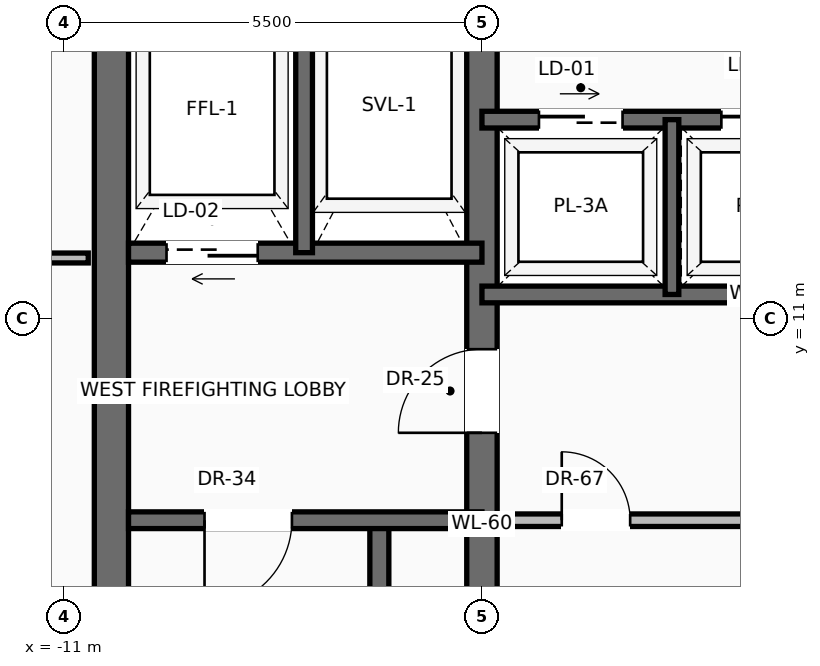
"""IFC4 building model, lengths in metres.
Left out: names, types, materials, properties, quantities, classifications, styles, units other than length and angle.
Written with IfcOpenShell. Run it as: python <this file> out.ifc"""

import sys

from ifc_helpers import new_model, si_unit, direction, frame, frame_2d, origin, place, context, subcontext, project, spatial, rectangle, extrude, source, transform, mapped, element, fill, save


model = new_model("IFC4")
c1 = context("Model", 3, precision=1e-05, world=origin(), true_north=direction((0.0, 1.0)))
c2 = subcontext(c1, "Body", "Model", "MODEL_VIEW")
j1 = project(units=[si_unit("LENGTHUNIT", "METRE"), si_unit("PLANEANGLEUNIT", "RADIAN")], contexts=[c1])
p1 = place(None, origin())
s1 = spatial("IfcSite", under=j1, at=p1, CompositionType="ELEMENT")
p2 = place(p1, origin())
s2 = spatial("IfcBuilding", under=s1, at=p2, CompositionType="ELEMENT")
p3 = place(p2, frame((0.0, 0.0, 293.7)))
s3 = spatial("IfcBuildingStorey", under=s2, at=p3, CompositionType="ELEMENT", Elevation=293.7)
p4 = place(p3, frame((-10.375, 0.625, 0.0), z_axis=(0.0, 0.0, 1.0), x_axis=(0.0, 1.0, 0.0)))
e1 = element("IfcWall", 1, at=p4, inside=s3, PredefinedType="SHEAR", context=c2, shape_type="SweptSolid", body=[
    extrude(rectangle(XDim=15.35, YDim=0.45, at=frame_2d((7.675, 0.0))), origin(), (0.0, 0.0, 1.0), 3.24),
])
p5 = place(p3, frame((-5.5, 0.625, 0.0), z_axis=(0.0, 0.0, 1.0), x_axis=(0.0, 1.0, 0.0)))
e2 = element("IfcWall", 2, at=p5, inside=s3, PredefinedType="SHEAR", context=c2, shape_type="SweptSolid", body=[
    extrude(rectangle(XDim=15.35, YDim=0.4, at=frame_2d((7.675, 0.0))), origin(), (0.0, 0.0, 1.0), 3.24),
])
p6 = place(p5, frame((8.875, 0.0, 0.0)))
e3 = element("IfcOpeningElement", 3, at=p6, cuts=e2, PredefinedType="OPENING", context=c2, shape_type="SweptSolid", body=[
    extrude(rectangle(XDim=1.1, YDim=2.2, at=frame_2d((0.55, 1.1))), frame((0.0, 0.21, 0.0), z_axis=(0.0, -1.0, 0.0), x_axis=(1.0, 0.0, 0.0)), (0.0, 0.0, 1.0), 0.42),
])
p7 = place(p3, frame((-17.955, 13.837, 0.0), z_axis=(0.0, 0.0, 1.0), x_axis=(0.49757006288, 0.867423790616, 0.0)))
e4 = element("IfcWall", 4, at=p7, inside=s3, PredefinedType="SOLIDWALL", context=c2, shape_type="SweptSolid", body=[
    extrude(rectangle(XDim=20.328, YDim=0.28, at=frame_2d((10.164, 0.0))), origin(), (0.0, 0.0, 1.0), 2.82),
])
p8 = place(p7, frame((4.879, 0.0, 0.0)))
e5 = element("IfcOpeningElement", 5, at=p8, cuts=e4, PredefinedType="OPENING", context=c2, shape_type="SweptSolid", body=[
    extrude(rectangle(XDim=1.6, YDim=2.35, at=frame_2d((0.8, 1.175))), frame((0.0, 0.15, 0.0), z_axis=(0.0, -1.0, 0.0), x_axis=(1.0, 0.0, 0.0)), (0.0, 0.0, 1.0), 0.3),
])
p9 = place(p7, frame((13.823, 0.0, 0.9)))
e6 = element("IfcOpeningElement", 6, at=p9, cuts=e4, PredefinedType="OPENING", context=c2, shape_type="SweptSolid", body=[
    extrude(rectangle(XDim=1.55, YDim=1.75, at=frame_2d((0.775, 0.875))), frame((0.0, 0.15, 0.0), z_axis=(0.0, -1.0, 0.0), x_axis=(1.0, 0.0, 0.0)), (0.0, 0.0, 1.0), 0.3),
])
p10 = place(p3, frame((-6.85, 0.85, 0.0), z_axis=(0.0, 0.0, 1.0), x_axis=(0.0, 1.0, 0.0)))
e7 = element("IfcWall", 7, at=p10, inside=s3, PredefinedType="SOLIDWALL", context=c2, shape_type="SweptSolid", body=[
    extrude(rectangle(XDim=7.5, YDim=0.25, at=frame_2d((3.75, 0.0))), origin(), (0.0, 0.0, 1.0), 3.24),
])
p11 = place(p3, frame((-5.5, 8.35, 0.0), z_axis=(0.0, 0.0, 1.0), x_axis=(-1.0, 0.0, 0.0)))
e8 = element("IfcWall", 8, at=p11, inside=s3, PredefinedType="SOLIDWALL", context=c2, shape_type="SweptSolid", body=[
    extrude(rectangle(XDim=4.65, YDim=0.22, at=frame_2d((2.325, 0.0))), origin(), (0.0, 0.0, 1.0), 3.24),
])
p12 = place(p11, frame((2.5, 0.0, 0.0)))
e9 = element("IfcOpeningElement", 9, at=p12, cuts=e8, PredefinedType="OPENING", context=c2, shape_type="SweptSolid", body=[
    extrude(rectangle(XDim=1.15, YDim=2.2, at=frame_2d((0.575, 1.1))), frame((0.0, 0.12, 0.0), z_axis=(0.0, -1.0, 0.0), x_axis=(1.0, 0.0, 0.0)), (0.0, 0.0, 1.0), 0.24),
])
p13 = place(p3, frame((-5.5, 11.87, 0.0), z_axis=(0.0, 0.0, 1.0), x_axis=(-1.0, 0.0, 0.0)))
e10 = element("IfcWall", 10, at=p13, inside=s3, PredefinedType="SOLIDWALL", context=c2, shape_type="SweptSolid", body=[
    extrude(rectangle(XDim=4.65, YDim=0.25, at=frame_2d((2.325, 0.0))), origin(), (0.0, 0.0, 1.0), 3.24),
])
p14 = place(p13, frame((2.95, 0.0, 0.0)))
e11 = element("IfcOpeningElement", 11, at=p14, cuts=e10, PredefinedType="OPENING", context=c2, shape_type="SweptSolid", body=[
    extrude(rectangle(XDim=1.2, YDim=2.25, at=frame_2d((0.6, 1.125))), frame((0.0, 0.135, 0.0), z_axis=(0.0, -1.0, 0.0), x_axis=(1.0, 0.0, 0.0)), (0.0, 0.0, 1.0), 0.27),
])
p15 = place(p3, frame((-7.84, 11.87, 0.0), z_axis=(0.0, 0.0, 1.0), x_axis=(0.0, 1.0, 0.0)))
e12 = element("IfcWall", 12, at=p15, inside=s3, PredefinedType="SOLIDWALL", context=c2, shape_type="SweptSolid", body=[
    extrude(rectangle(XDim=3.88, YDim=0.22, at=frame_2d((1.94, 0.0))), origin(), (0.0, 0.0, 1.0), 3.24),
])
p16 = place(p3, frame((-5.3, 8.35, 0.0), z_axis=(0.0, 0.0, 1.0), x_axis=(1.0, 0.0, 0.0)))
e13 = element("IfcWall", 13, at=p16, inside=s3, PredefinedType="PARTITIONING", context=c2, shape_type="SweptSolid", body=[
    extrude(rectangle(XDim=7.12, YDim=0.165, at=frame_2d((3.56, 0.0))), origin(), (0.0, 0.0, 1.0), 3.232),
])
p17 = place(p16, frame((0.85, 0.0, 0.0)))
e14 = element("IfcOpeningElement", 14, at=p17, cuts=e13, PredefinedType="OPENING", context=c2, shape_type="SweptSolid", body=[
    extrude(rectangle(XDim=0.9, YDim=2.1, at=frame_2d((0.45, 1.05))), frame((0.0, 0.093, 0.0), z_axis=(0.0, -1.0, 0.0), x_axis=(1.0, 0.0, 0.0)), (0.0, 0.0, 1.0), 0.185),
])
p18 = place(p16, frame((5.65, 0.0, 0.0)))
e15 = element("IfcOpeningElement", 15, at=p18, cuts=e13, PredefinedType="OPENING", context=c2, shape_type="SweptSolid", body=[
    extrude(rectangle(XDim=0.9, YDim=2.1, at=frame_2d((0.45, 1.05))), frame((0.0, 0.093, 0.0), z_axis=(0.0, -1.0, 0.0), x_axis=(1.0, 0.0, 0.0)), (0.0, 0.0, 1.0), 0.185),
])
p19 = place(p3, frame((-5.5, 11.32, 0.0), z_axis=(0.0, 0.0, 1.0), x_axis=(1.0, 0.0, 0.0)))
e16 = element("IfcWall", 16, at=p19, inside=s3, PredefinedType="SOLIDWALL", context=c2, shape_type="SweptSolid", body=[
    extrude(rectangle(XDim=7.32, YDim=0.22, at=frame_2d((3.66, 0.0))), origin(), (0.0, 0.0, 1.0), 3.24),
])
p20 = place(p3, frame((-5.5, 13.62, 0.0), z_axis=(0.0, 0.0, 1.0), x_axis=(1.0, 0.0, 0.0)))
e17 = element("IfcWall", 17, at=p20, inside=s3, PredefinedType="SOLIDWALL", context=c2, shape_type="SweptSolid", body=[
    extrude(rectangle(XDim=7.32, YDim=0.22, at=frame_2d((3.66, 0.0))), origin(), (0.0, 0.0, 1.0), 3.24),
])
p21 = place(p20, frame((0.75, 0.0, 0.0)))
e18 = element("IfcOpeningElement", 18, at=p21, cuts=e17, PredefinedType="OPENING", context=c2, shape_type="SweptSolid", body=[
    extrude(rectangle(XDim=1.1, YDim=2.2, at=frame_2d((0.55, 1.1))), frame((0.0, 0.12, 0.0), z_axis=(0.0, -1.0, 0.0), x_axis=(1.0, 0.0, 0.0)), (0.0, 0.0, 1.0), 0.24),
])
p22 = place(p20, frame((3.15, 0.0, 0.0)))
e19 = element("IfcOpeningElement", 19, at=p22, cuts=e17, PredefinedType="OPENING", context=c2, shape_type="SweptSolid", body=[
    extrude(rectangle(XDim=1.1, YDim=2.2, at=frame_2d((0.55, 1.1))), frame((0.0, 0.12, 0.0), z_axis=(0.0, -1.0, 0.0), x_axis=(1.0, 0.0, 0.0)), (0.0, 0.0, 1.0), 0.24),
])
p23 = place(p20, frame((5.55, 0.0, 0.0)))
e20 = element("IfcOpeningElement", 20, at=p23, cuts=e17, PredefinedType="OPENING", context=c2, shape_type="SweptSolid", body=[
    extrude(rectangle(XDim=1.1, YDim=2.2, at=frame_2d((0.55, 1.1))), frame((0.0, 0.12, 0.0), z_axis=(0.0, -1.0, 0.0), x_axis=(1.0, 0.0, 0.0)), (0.0, 0.0, 1.0), 0.24),
])
p24 = place(p3, frame((-3.0, 11.32, 0.0), z_axis=(0.0, 0.0, 1.0), x_axis=(0.0, 1.0, 0.0)))
e21 = element("IfcWall", 21, at=p24, inside=s3, PredefinedType="SOLIDWALL", context=c2, shape_type="SweptSolid", body=[
    extrude(rectangle(XDim=2.3, YDim=0.18, at=frame_2d((1.15, 0.0))), origin(), (0.0, 0.0, 1.0), 3.24),
])
p25 = place(p3, frame((-19.273, 11.8, 0.0), z_axis=(0.0, 0.0, 1.0), x_axis=(1.0, 0.0, 0.0)))
e22 = element("IfcWall", 22, at=p25, inside=s3, PredefinedType="PARTITIONING", context=c2, shape_type="SweptSolid", body=[
    extrude(rectangle(XDim=8.593, YDim=0.13, at=frame_2d((4.297, 0.0))), origin(), (0.0, 0.0, 1.0), 3.232),
])
p26 = place(p25, frame((3.426, 0.0, 0.0)))
e23 = element("IfcOpeningElement", 23, at=p26, cuts=e22, PredefinedType="OPENING", context=c2, shape_type="SweptSolid", body=[
    extrude(rectangle(XDim=0.95, YDim=2.2, at=frame_2d((0.475, 1.1))), frame((0.0, 0.075, 0.0), z_axis=(0.0, -1.0, 0.0), x_axis=(1.0, 0.0, 0.0)), (0.0, 0.0, 1.0), 0.15),
])
m1 = source(origin(), c2, "Body", "SweptSolid", [
    extrude(rectangle(XDim=1.15, YDim=2.2, at=frame_2d((0.575, 1.1))), frame((0.0, 0.025, 0.0), z_axis=(0.0, -1.0, 0.0), x_axis=(1.0, 0.0, 0.0)), (0.0, 0.0, 1.0), 0.05),
])
p27 = place(p12, origin())
e24 = element("IfcDoor", 24, at=p27, inside=s3, OperationType="SINGLE_SWING_RIGHT", PredefinedType="DOOR", context=c2, shape_type="MappedRepresentation", body=[
    mapped(m1, transform((0.0, 0.0, 0.0), scale=1.0)),
])
fill(e9, e24)
m2 = source(origin(), c2, "Body", "SweptSolid", [
    extrude(rectangle(XDim=1.1, YDim=2.2, at=frame_2d((0.55, 1.1))), frame((0.0, 0.025, 0.0), z_axis=(0.0, -1.0, 0.0), x_axis=(1.0, 0.0, 0.0)), (0.0, 0.0, 1.0), 0.05),
])
p28 = place(p6, origin())
e25 = element("IfcDoor", 25, at=p28, inside=s3, OperationType="SINGLE_SWING_LEFT", PredefinedType="DOOR", context=c2, shape_type="MappedRepresentation", body=[
    mapped(m2, transform((0.0, 0.0, 0.0), scale=1.0)),
])
fill(e3, e25)
m3 = source(origin(), c2, "Body", "SweptSolid", [
    extrude(rectangle(XDim=1.2, YDim=2.25, at=frame_2d((0.6, 1.125))), frame((0.0, 0.025, 0.0), z_axis=(0.0, -1.0, 0.0), x_axis=(1.0, 0.0, 0.0)), (0.0, 0.0, 1.0), 0.05),
])
p29 = place(p14, origin())
e26 = element("IfcDoor", 26, at=p29, inside=s3, OperationType="SLIDING_TO_LEFT", PredefinedType="DOOR", context=c2, shape_type="MappedRepresentation", body=[
    mapped(m3, transform((0.0, 0.0, 0.0), scale=1.0)),
])
fill(e11, e26)
m4 = source(origin(), c2, "Body", "SweptSolid", [
    extrude(rectangle(XDim=0.9, YDim=2.1, at=frame_2d((0.45, 1.05))), frame((0.0, 0.025, 0.0), z_axis=(0.0, -1.0, 0.0), x_axis=(1.0, 0.0, 0.0)), (0.0, 0.0, 1.0), 0.05),
])
p30 = place(p17, origin())
e27 = element("IfcDoor", 27, at=p30, inside=s3, OperationType="SINGLE_SWING_LEFT", PredefinedType="DOOR", context=c2, shape_type="MappedRepresentation", body=[
    mapped(m4, transform((0.0, 0.0, 0.0), scale=1.0)),
])
fill(e14, e27)
m5 = source(origin(), c2, "Body", "SweptSolid", [
    extrude(rectangle(XDim=1.1, YDim=2.2, at=frame_2d((0.55, 1.1))), frame((0.0, 0.025, 0.0), z_axis=(0.0, -1.0, 0.0), x_axis=(1.0, 0.0, 0.0)), (0.0, 0.0, 1.0), 0.05),
])
p31 = place(p21, origin())
e28 = element("IfcDoor", 28, at=p31, inside=s3, OperationType="SLIDING_TO_RIGHT", PredefinedType="DOOR", context=c2, shape_type="MappedRepresentation", body=[
    mapped(m5, transform((0.0, 0.0, 0.0), scale=1.0)),
])
fill(e18, e28)
p32 = place(p22, origin())
e29 = element("IfcDoor", 29, at=p32, inside=s3, OperationType="SLIDING_TO_RIGHT", PredefinedType="DOOR", context=c2, shape_type="MappedRepresentation", body=[
    mapped(m5, transform((0.0, 0.0, 0.0), scale=1.0)),
])
fill(e19, e29)
save(model, sys.argv[1])
